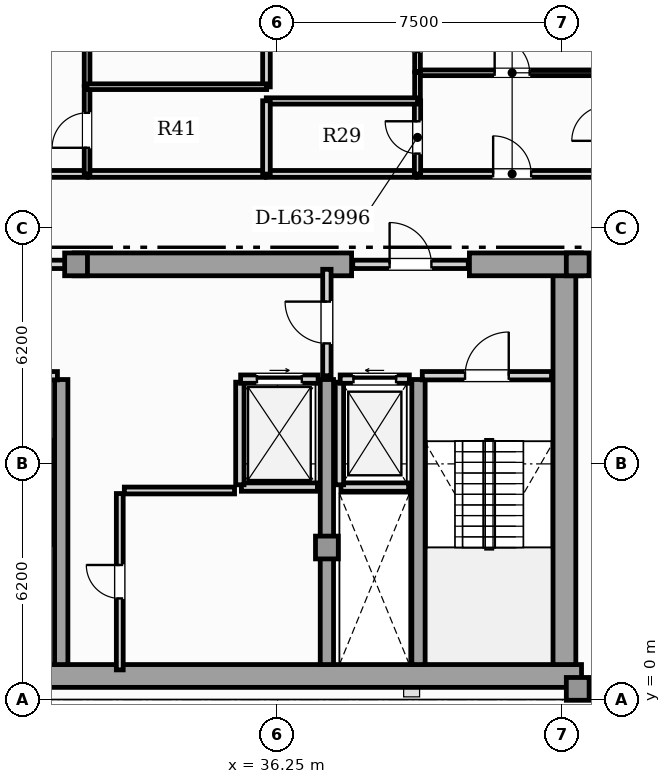
"""IFC4 building model, lengths in metres.
Left out: names, types, materials, properties, quantities, classifications, styles, units other than length and angle.
Written with IfcOpenShell. Run it as: python <this file> out.ifc"""

import sys

from ifc_helpers import new_model, si_unit, direction, frame, frame_2d, origin, origin_2d, place, context, subcontext, project, spatial, rectangle, extrude, element, fill, save


model = new_model("IFC4")
c1 = context("Model", 3, precision=1e-05, world=origin(), true_north=direction((0.0, 1.0)))
c2 = subcontext(c1, "Body", "Model", "MODEL_VIEW")
j1 = project(units=[si_unit("LENGTHUNIT", "METRE"), si_unit("PLANEANGLEUNIT", "RADIAN")], contexts=[c1])
p1 = place(None, origin())
s1 = spatial("IfcSite", under=j1, at=p1, CompositionType="ELEMENT")
p2 = place(p1, origin())
s2 = spatial("IfcBuilding", under=s1, at=p2, CompositionType="ELEMENT")
p3 = place(p2, frame((0.0, 0.0, 256.75)))
s3 = spatial("IfcBuildingStorey", under=s2, at=p3, CompositionType="ELEMENT", Elevation=256.75)
p4 = place(p3, frame((13.25, 0.62, 0.0), z_axis=(0.0, 0.0, 1.0), x_axis=(1.0, 0.0, 0.0)))
e1 = element("IfcWall", 1, at=p4, inside=s3, PredefinedType="SHEAR", context=c2, shape_type="SweptSolid", body=[
    extrude(rectangle(XDim=31.0, YDim=0.6, at=frame_2d((15.5, 0.0))), origin(), (0.0, 0.0, 1.0), 3.65),
])
p5 = place(p3, frame((43.8, 0.92, 0.0), z_axis=(0.0, 0.0, 1.0), x_axis=(0.0, 1.0, 0.0)))
e2 = element("IfcWall", 2, at=p5, inside=s3, PredefinedType="SHEAR", context=c2, shape_type="SweptSolid", body=[
    extrude(rectangle(XDim=10.53, YDim=0.6, at=frame_2d((5.265, 0.0))), origin(), (0.0, 0.0, 1.0), 3.65),
])
p6 = place(p3, frame((30.9, 11.45, 0.0), z_axis=(0.0, 0.0, 1.0), x_axis=(1.0, 0.0, 0.0)))
e3 = element("IfcWall", 3, at=p6, inside=s3, PredefinedType="SHEAR", context=c2, shape_type="SweptSolid", body=[
    extrude(rectangle(XDim=7.3, YDim=0.6, at=frame_2d((3.65, 0.0))), origin(), (0.0, 0.0, 1.0), 3.65),
])
p7 = place(p3, frame((41.3, 11.45, 0.0), z_axis=(0.0, 0.0, 1.0), x_axis=(1.0, 0.0, 0.0)))
e4 = element("IfcWall", 4, at=p7, inside=s3, PredefinedType="SHEAR", context=c2, shape_type="SweptSolid", body=[
    extrude(rectangle(XDim=2.95, YDim=0.6, at=frame_2d((1.475, 0.0))), origin(), (0.0, 0.0, 1.0), 3.65),
])
for number, where, z_axis, x_axis in (
    (5, (30.56, 0.92, 0.0), (0.0, 0.0, 1.0), (0.0, 1.0, 0.0)),
    (6, (37.55, 0.92, 0.0), (0.0, 0.0, 1.0), (0.0, 1.0, 0.0)),
    (7, (39.96, 0.92, 0.0), (0.0, 0.0, 1.0), (0.0, 1.0, 0.0)),
):
    element("IfcWall", number, at=place(p3, frame(where, z_axis=z_axis, x_axis=x_axis)), inside=s3, PredefinedType="SHEAR", context=c2, shape_type="SweptSolid", body=[
        extrude(rectangle(XDim=7.5, YDim=0.35, at=frame_2d((3.75, 0.0))), origin(), (0.0, 0.0, 1.0), 3.65),
    ])
for number, where, z_axis, x_axis in (
    (8, (44.15, 0.28, 0.0), (0.0, 0.0, 1.0), (1.0, 0.0, 0.0)),
    (9, (44.15, 11.45, 0.0), (0.0, 0.0, 1.0), (1.0, 0.0, 0.0)),
    (10, (37.55, 4.0, 0.0), (0.0, 0.0, 1.0), (1.0, 0.0, 0.0)),
    (11, (30.95, 11.45, 0.0), (0.0, 0.0, 1.0), (1.0, 0.0, 0.0)),
):
    element("IfcColumn", number, at=place(p3, frame(where, z_axis=z_axis, x_axis=x_axis)), inside=s3, PredefinedType="COLUMN", context=c2, shape_type="SweptSolid", body=[
        extrude(rectangle(XDim=0.6, YDim=0.6, at=origin_2d()), origin(), (0.0, 0.0, 1.0), 3.85),
    ])
p8 = place(p3, frame((44.25, 0.18, 0.0), z_axis=(0.0, 0.0, 1.0), x_axis=(1.0, 0.0, 0.0)))
e12 = element("IfcWall", 12, at=p8, inside=s3, PredefinedType="SOLIDWALL", context=c2, shape_type="SweptSolid", body=[
    extrude(rectangle(XDim=2.083, YDim=0.26, at=frame_2d((1.042, 0.0))), origin(), (0.0, 0.0, 1.0), 3.65),
])
p9 = place(p3, frame((37.92, 5.59, 0.0), z_axis=(0.0, 0.0, 1.0), x_axis=(1.0, 0.0, 0.0)))
e13 = element("IfcWall", 13, at=p9, inside=s3, PredefinedType="SOLIDWALL", context=c2, shape_type="SweptSolid", body=[
    extrude(rectangle(XDim=1.78, YDim=0.22, at=frame_2d((0.89, 0.0))), origin(), (0.0, 0.0, 1.0), 3.65),
])
p10 = place(p3, frame((37.88, 5.65, 0.0), z_axis=(0.0, 0.0, 1.0), x_axis=(0.0, 1.0, 0.0)))
e14 = element("IfcWall", 14, at=p10, inside=s3, PredefinedType="SOLIDWALL", context=c2, shape_type="SweptSolid", body=[
    extrude(rectangle(XDim=2.7, YDim=0.22, at=frame_2d((1.35, 0.0))), origin(), (0.0, 0.0, 1.0), 3.65),
])
p11 = place(p3, frame((37.9, 8.43, 0.0), z_axis=(0.0, 0.0, 1.0), x_axis=(1.0, 0.0, 0.0)))
e15 = element("IfcWall", 15, at=p11, inside=s3, PredefinedType="SOLIDWALL", context=c2, shape_type="SweptSolid", body=[
    extrude(rectangle(XDim=1.82, YDim=0.22, at=frame_2d((0.91, 0.0))), origin(), (0.0, 0.0, 1.0), 3.65),
])
p12 = place(p11, frame((0.35, 0.0, 0.0)))
e16 = element("IfcOpeningElement", 16, at=p12, cuts=e15, PredefinedType="OPENING", context=c2, shape_type="SweptSolid", body=[
    extrude(rectangle(XDim=1.12, YDim=2.25, at=frame_2d((0.56, 1.125))), frame((0.0, 0.12, 0.0), z_axis=(0.0, -1.0, 0.0), x_axis=(1.0, 0.0, 0.0)), (0.0, 0.0, 1.0), 0.24),
])
p13 = place(p3, frame((35.3, 5.59, 0.0), z_axis=(0.0, 0.0, 1.0), x_axis=(1.0, 0.0, 0.0)))
e17 = element("IfcWall", 17, at=p13, inside=s3, PredefinedType="SOLIDWALL", context=c2, shape_type="SweptSolid", body=[
    extrude(rectangle(XDim=2.0, YDim=0.22, at=frame_2d((1.0, 0.0))), origin(), (0.0, 0.0, 1.0), 3.65),
])
p14 = place(p3, frame((35.26, 5.65, 0.0), z_axis=(0.0, 0.0, 1.0), x_axis=(0.0, 1.0, 0.0)))
e18 = element("IfcWall", 18, at=p14, inside=s3, PredefinedType="SOLIDWALL", context=c2, shape_type="SweptSolid", body=[
    extrude(rectangle(XDim=2.7, YDim=0.22, at=frame_2d((1.35, 0.0))), origin(), (0.0, 0.0, 1.0), 3.65),
])
p15 = place(p3, frame((35.28, 8.43, 0.0), z_axis=(0.0, 0.0, 1.0), x_axis=(1.0, 0.0, 0.0)))
e19 = element("IfcWall", 19, at=p15, inside=s3, PredefinedType="SOLIDWALL", context=c2, shape_type="SweptSolid", body=[
    extrude(rectangle(XDim=2.04, YDim=0.22, at=frame_2d((1.02, 0.0))), origin(), (0.0, 0.0, 1.0), 3.65),
])
p16 = place(p15, frame((0.43, 0.0, 0.0)))
e20 = element("IfcOpeningElement", 20, at=p16, cuts=e19, PredefinedType="OPENING", context=c2, shape_type="SweptSolid", body=[
    extrude(rectangle(XDim=1.18, YDim=2.2, at=frame_2d((0.59, 1.1))), frame((0.0, 0.12, 0.0), z_axis=(0.0, -1.0, 0.0), x_axis=(1.0, 0.0, 0.0)), (0.0, 0.0, 1.0), 0.24),
])
p17 = place(p3, frame((40.06, 8.52, 0.0), z_axis=(0.0, 0.0, 1.0), x_axis=(1.0, 0.0, 0.0)))
e21 = element("IfcWall", 21, at=p17, inside=s3, PredefinedType="SOLIDWALL", context=c2, shape_type="SweptSolid", body=[
    extrude(rectangle(XDim=3.4, YDim=0.22, at=frame_2d((1.7, 0.0))), origin(), (0.0, 0.0, 1.0), 3.65),
])
p18 = place(p17, frame((1.125, 0.0, 0.0)))
e22 = element("IfcOpeningElement", 22, at=p18, cuts=e21, PredefinedType="OPENING", context=c2, shape_type="SweptSolid", body=[
    extrude(rectangle(XDim=1.15, YDim=2.2, at=frame_2d((0.575, 1.1))), frame((0.0, 0.12, 0.0), z_axis=(0.0, -1.0, 0.0), x_axis=(1.0, 0.0, 0.0)), (0.0, 0.0, 1.0), 0.24),
])
p19 = place(p3, frame((27.04, 8.52, 0.0), z_axis=(0.0, 0.0, 1.0), x_axis=(1.0, 0.0, 0.0)))
e23 = element("IfcWall", 23, at=p19, inside=s3, PredefinedType="SOLIDWALL", context=c2, shape_type="SweptSolid", body=[
    extrude(rectangle(XDim=3.42, YDim=0.22, at=frame_2d((1.71, 0.0))), origin(), (0.0, 0.0, 1.0), 3.65),
])
p20 = place(p19, frame((1.135, 0.0, 0.0)))
e24 = element("IfcOpeningElement", 24, at=p20, cuts=e23, PredefinedType="OPENING", context=c2, shape_type="SweptSolid", body=[
    extrude(rectangle(XDim=1.15, YDim=2.2, at=frame_2d((0.575, 1.1))), frame((0.0, 0.12, 0.0), z_axis=(0.0, -1.0, 0.0), x_axis=(1.0, 0.0, 0.0)), (0.0, 0.0, 1.0), 0.24),
])
p21 = place(p3, frame((37.55, 8.52, 0.0), z_axis=(0.0, 0.0, 1.0), x_axis=(0.0, 1.0, 0.0)))
e25 = element("IfcWall", 25, at=p21, inside=s3, PredefinedType="SOLIDWALL", context=c2, shape_type="SweptSolid", body=[
    extrude(rectangle(XDim=2.8, YDim=0.22, at=frame_2d((1.4, 0.0))), origin(), (0.0, 0.0, 1.0), 3.105),
])
p22 = place(p21, frame((0.85, 0.0, 0.0)))
e26 = element("IfcOpeningElement", 26, at=p22, cuts=e25, PredefinedType="OPENING", context=c2, shape_type="SweptSolid", body=[
    extrude(rectangle(XDim=1.1, YDim=2.2, at=frame_2d((0.55, 1.1))), frame((0.0, 0.12, 0.0), z_axis=(0.0, -1.0, 0.0), x_axis=(1.0, 0.0, 0.0)), (0.0, 0.0, 1.0), 0.24),
])
p23 = place(p3, frame((26.63, 11.45, 0.0), z_axis=(0.0, 0.0, 1.0), x_axis=(1.0, 0.0, 0.0)))
e27 = element("IfcWall", 27, at=p23, inside=s3, PredefinedType="SOLIDWALL", context=c2, shape_type="SweptSolid", body=[
    extrude(rectangle(XDim=4.24, YDim=0.22, at=frame_2d((2.12, 0.0))), origin(), (0.0, 0.0, 1.0), 3.65),
])
p24 = place(p23, frame((1.42, 0.0, 0.0)))
e28 = element("IfcOpeningElement", 28, at=p24, cuts=e27, PredefinedType="OPENING", context=c2, shape_type="SweptSolid", body=[
    extrude(rectangle(XDim=1.4, YDim=2.2, at=frame_2d((0.7, 1.1))), frame((0.0, 0.12, 0.0), z_axis=(0.0, -1.0, 0.0), x_axis=(1.0, 0.0, 0.0)), (0.0, 0.0, 1.0), 0.24),
])
p25 = place(p3, frame((38.23, 11.45, 0.0), z_axis=(0.0, 0.0, 1.0), x_axis=(1.0, 0.0, 0.0)))
e29 = element("IfcWall", 29, at=p25, inside=s3, PredefinedType="SOLIDWALL", context=c2, shape_type="SweptSolid", body=[
    extrude(rectangle(XDim=3.04, YDim=0.22, at=frame_2d((1.52, 0.0))), origin(), (0.0, 0.0, 1.0), 3.65),
])
p26 = place(p25, frame((0.97, 0.0, 0.0)))
e30 = element("IfcOpeningElement", 30, at=p26, cuts=e29, PredefinedType="OPENING", context=c2, shape_type="SweptSolid", body=[
    extrude(rectangle(XDim=1.1, YDim=2.2, at=frame_2d((0.55, 1.1))), frame((0.0, 0.12, 0.0), z_axis=(0.0, -1.0, 0.0), x_axis=(1.0, 0.0, 0.0)), (0.0, 0.0, 1.0), 0.24),
])
p27 = place(p3, frame((32.1, 0.78, 0.0), z_axis=(0.0, 0.0, 1.0), x_axis=(0.0, 1.0, 0.0)))
e31 = element("IfcWall", 31, at=p27, inside=s3, PredefinedType="PARTITIONING", context=c2, shape_type="SweptSolid", body=[
    extrude(rectangle(XDim=4.64, YDim=0.18, at=frame_2d((2.32, 0.0))), origin(), (0.0, 0.0, 1.0), 3.65),
])
p28 = place(p27, frame((1.88, 0.0, 0.0)))
e32 = element("IfcOpeningElement", 32, at=p28, cuts=e31, PredefinedType="OPENING", context=c2, shape_type="SweptSolid", body=[
    extrude(rectangle(XDim=0.88, YDim=2.05, at=frame_2d((0.44, 1.025))), frame((0.0, 0.1, 0.0), z_axis=(0.0, -1.0, 0.0), x_axis=(1.0, 0.0, 0.0)), (0.0, 0.0, 1.0), 0.2),
])
p29 = place(p3, frame((32.22, 5.5, 0.0), z_axis=(0.0, 0.0, 1.0), x_axis=(1.0, 0.0, 0.0)))
e33 = element("IfcWall", 33, at=p29, inside=s3, PredefinedType="PARTITIONING", context=c2, shape_type="SweptSolid", body=[
    extrude(rectangle(XDim=2.9, YDim=0.18, at=frame_2d((1.45, 0.0))), origin(), (0.0, 0.0, 1.0), 3.65),
])
p30 = place(p3, frame((44.355, 11.6, 0.0), z_axis=(0.0, 0.0, 1.0), x_axis=(1.0, 0.0, 0.0)))
e34 = element("IfcWall", 34, at=p30, inside=s3, PredefinedType="PARTITIONING", context=c2, shape_type="SweptSolid", body=[
    extrude(rectangle(XDim=5.069, YDim=0.18, at=frame_2d((2.534, 0.0))), origin(), (0.0, 0.0, 1.0), 3.65),
])
p31 = place(p30, frame((2.034, 0.0, 0.0)))
e35 = element("IfcOpeningElement", 35, at=p31, cuts=e34, PredefinedType="OPENING", context=c2, shape_type="SweptSolid", body=[
    extrude(rectangle(XDim=1.0, YDim=2.15, at=frame_2d((0.5, 1.075))), frame((0.0, 0.1, 0.0), z_axis=(0.0, -1.0, 0.0), x_axis=(1.0, 0.0, 0.0)), (0.0, 0.0, 1.0), 0.2),
])
p32 = place(p3, frame((39.929, 13.83, 0.0), z_axis=(0.0, 0.0, 1.0), x_axis=(1.0, 0.0, 0.0)))
e36 = element("IfcWall", 36, at=p32, inside=s3, PredefinedType="PARTITIONING", context=c2, shape_type="SweptSolid", body=[
    extrude(rectangle(XDim=4.99, YDim=0.18, at=frame_2d((2.495, 0.0))), origin(), (0.0, 0.0, 1.0), 3.65),
])
p33 = place(p32, frame((1.995, 0.0, 0.0)))
e37 = element("IfcOpeningElement", 37, at=p33, cuts=e36, PredefinedType="OPENING", context=c2, shape_type="SweptSolid", body=[
    extrude(rectangle(XDim=1.0, YDim=2.15, at=frame_2d((0.5, 1.075))), frame((0.0, 0.1, 0.0), z_axis=(0.0, -1.0, 0.0), x_axis=(1.0, 0.0, 0.0)), (0.0, 0.0, 1.0), 0.2),
])
p34 = place(p3, frame((35.955, 13.83, 0.0), z_axis=(0.0, 0.0, 1.0), x_axis=(1.0, 0.0, 0.0)))
e38 = element("IfcWall", 38, at=p34, inside=s3, PredefinedType="PARTITIONING", context=c2, shape_type="SweptSolid", body=[
    extrude(rectangle(XDim=3.944, YDim=0.18, at=frame_2d((1.972, 0.0))), origin(), (0.0, 0.0, 1.0), 3.65),
])
p35 = place(p3, frame((26.255, 13.83, 0.0), z_axis=(0.0, 0.0, 1.0), x_axis=(1.0, 0.0, 0.0)))
e39 = element("IfcWall", 39, at=p35, inside=s3, PredefinedType="PARTITIONING", context=c2, shape_type="SweptSolid", body=[
    extrude(rectangle(XDim=4.99, YDim=0.18, at=frame_2d((2.495, 0.0))), origin(), (0.0, 0.0, 1.0), 3.65),
])
p36 = place(p35, frame((1.995, 0.0, 0.0)))
e40 = element("IfcOpeningElement", 40, at=p36, cuts=e39, PredefinedType="OPENING", context=c2, shape_type="SweptSolid", body=[
    extrude(rectangle(XDim=1.0, YDim=2.15, at=frame_2d((0.5, 1.075))), frame((0.0, 0.1, 0.0), z_axis=(0.0, -1.0, 0.0), x_axis=(1.0, 0.0, 0.0)), (0.0, 0.0, 1.0), 0.2),
])
p37 = place(p3, frame((31.275, 13.83, 0.0), z_axis=(0.0, 0.0, 1.0), x_axis=(1.0, 0.0, 0.0)))
e41 = element("IfcWall", 41, at=p37, inside=s3, PredefinedType="PARTITIONING", context=c2, shape_type="SweptSolid", body=[
    extrude(rectangle(XDim=4.65, YDim=0.18, at=frame_2d((2.325, 0.0))), origin(), (0.0, 0.0, 1.0), 3.65),
])
p38 = place(p3, frame((39.929, 16.49, 0.0), z_axis=(0.0, 0.0, 1.0), x_axis=(1.0, 0.0, 0.0)))
e42 = element("IfcWall", 42, at=p38, inside=s3, PredefinedType="PARTITIONING", context=c2, shape_type="SweptSolid", body=[
    extrude(rectangle(XDim=4.99, YDim=0.15, at=frame_2d((2.495, 0.0))), origin(), (0.0, 0.0, 1.0), 3.65),
])
p39 = place(p38, frame((2.035, 0.0, 0.0)))
e43 = element("IfcOpeningElement", 43, at=p39, cuts=e42, PredefinedType="OPENING", context=c2, shape_type="SweptSolid", body=[
    extrude(rectangle(XDim=0.92, YDim=2.1, at=frame_2d((0.46, 1.05))), frame((0.0, 0.085, 0.0), z_axis=(0.0, -1.0, 0.0), x_axis=(1.0, 0.0, 0.0)), (0.0, 0.0, 1.0), 0.17),
])
p40 = place(p3, frame((39.934, 13.825, 0.0), z_axis=(0.0, 0.0, 1.0), x_axis=(0.0, 1.0, 0.0)))
e44 = element("IfcWall", 44, at=p40, inside=s3, PredefinedType="PLUMBINGWALL", context=c2, shape_type="SweptSolid", body=[
    extrude(rectangle(XDim=1.929, YDim=0.165, at=frame_2d((0.965, 0.0))), origin(), (0.0, 0.0, 1.0), 3.65),
])
p41 = place(p40, frame((0.54, 0.0, 0.0)))
e45 = element("IfcOpeningElement", 45, at=p41, cuts=e44, PredefinedType="OPENING", context=c2, shape_type="SweptSolid", body=[
    extrude(rectangle(XDim=0.85, YDim=2.1, at=frame_2d((0.425, 1.05))), frame((0.0, 0.093, 0.0), z_axis=(0.0, -1.0, 0.0), x_axis=(1.0, 0.0, 0.0)), (0.0, 0.0, 1.0), 0.185),
])
p42 = place(p3, frame((39.934, 15.784, 0.0), z_axis=(0.0, 0.0, 1.0), x_axis=(0.0, 1.0, 0.0)))
e46 = element("IfcWall", 46, at=p42, inside=s3, PredefinedType="PARTITIONING", context=c2, shape_type="SweptSolid", body=[
    extrude(rectangle(XDim=0.711, YDim=0.15, at=frame_2d((0.355, 0.0))), origin(), (0.0, 0.0, 1.0), 3.65),
])
p43 = place(p3, frame((39.934, 16.525, 0.0), z_axis=(0.0, 0.0, 1.0), x_axis=(0.0, 1.0, 0.0)))
e47 = element("IfcWall", 47, at=p43, inside=s3, PredefinedType="PARTITIONING", context=c2, shape_type="SweptSolid", body=[
    extrude(rectangle(XDim=1.939, YDim=0.15, at=frame_2d((0.97, 0.0))), origin(), (0.0, 0.0, 1.0), 3.65),
])
p44 = place(p43, frame((0.51, 0.0, 0.0)))
e48 = element("IfcOpeningElement", 48, at=p44, cuts=e47, PredefinedType="OPENING", context=c2, shape_type="SweptSolid", body=[
    extrude(rectangle(XDim=0.92, YDim=2.1, at=frame_2d((0.46, 1.05))), frame((0.0, 0.085, 0.0), z_axis=(0.0, -1.0, 0.0), x_axis=(1.0, 0.0, 0.0)), (0.0, 0.0, 1.0), 0.17),
])
p45 = place(p3, frame((35.955, 15.75, 0.0), z_axis=(0.0, 0.0, 1.0), x_axis=(1.0, 0.0, 0.0)))
e49 = element("IfcWall", 49, at=p45, inside=s3, PredefinedType="PLUMBINGWALL", context=c2, shape_type="SweptSolid", body=[
    extrude(rectangle(XDim=3.984, YDim=0.165, at=frame_2d((1.992, 0.0))), origin(), (0.0, 0.0, 1.0), 3.65),
])
p46 = place(p3, frame((35.96, 13.825, 0.0), z_axis=(0.0, 0.0, 1.0), x_axis=(0.0, 1.0, 0.0)))
e50 = element("IfcWall", 50, at=p46, inside=s3, PredefinedType="PARTITIONING", context=c2, shape_type="SweptSolid", body=[
    extrude(rectangle(XDim=1.929, YDim=0.2, at=frame_2d((0.965, 0.0))), origin(), (0.0, 0.0, 1.0), 3.65),
])
p47 = place(p3, frame((35.96, 16.119, 0.0), z_axis=(0.0, 0.0, 1.0), x_axis=(0.0, 1.0, 0.0)))
e51 = element("IfcWall", 51, at=p47, inside=s3, PredefinedType="PARTITIONING", context=c2, shape_type="SweptSolid", body=[
    extrude(rectangle(XDim=2.345, YDim=0.2, at=frame_2d((1.173, 0.0))), origin(), (0.0, 0.0, 1.0), 3.65),
])
p48 = place(p3, frame((31.24, 13.825, 0.0), z_axis=(0.0, 0.0, 1.0), x_axis=(0.0, 1.0, 0.0)))
e52 = element("IfcWall", 52, at=p48, inside=s3, PredefinedType="PARTITIONING", context=c2, shape_type="SweptSolid", body=[
    extrude(rectangle(XDim=2.304, YDim=0.15, at=frame_2d((1.152, 0.0))), origin(), (0.0, 0.0, 1.0), 3.65),
])
p49 = place(p48, frame((0.692, 0.0, 0.0)))
e53 = element("IfcOpeningElement", 53, at=p49, cuts=e52, PredefinedType="OPENING", context=c2, shape_type="SweptSolid", body=[
    extrude(rectangle(XDim=0.92, YDim=2.1, at=frame_2d((0.46, 1.05))), frame((0.0, 0.085, 0.0), z_axis=(0.0, -1.0, 0.0), x_axis=(1.0, 0.0, 0.0)), (0.0, 0.0, 1.0), 0.17),
])
p50 = place(p3, frame((31.24, 16.159, 0.0), z_axis=(0.0, 0.0, 1.0), x_axis=(0.0, 1.0, 0.0)))
e54 = element("IfcWall", 54, at=p50, inside=s3, PredefinedType="PARTITIONING", context=c2, shape_type="SweptSolid", body=[
    extrude(rectangle(XDim=6.922, YDim=0.15, at=frame_2d((3.461, 0.0))), origin(), (0.0, 0.0, 1.0), 3.65),
])
p51 = place(p50, frame((3.001, 0.0, 0.0)))
e55 = element("IfcOpeningElement", 55, at=p51, cuts=e54, PredefinedType="OPENING", context=c2, shape_type="SweptSolid", body=[
    extrude(rectangle(XDim=0.92, YDim=2.1, at=frame_2d((0.46, 1.05))), frame((0.0, 0.085, 0.0), z_axis=(0.0, -1.0, 0.0), x_axis=(1.0, 0.0, 0.0)), (0.0, 0.0, 1.0), 0.17),
])
p52 = place(p3, frame((31.235, 16.125, 0.0), z_axis=(0.0, 0.0, 1.0), x_axis=(1.0, 0.0, 0.0)))
e56 = element("IfcWall", 56, at=p52, inside=s3, PredefinedType="PARTITIONING", context=c2, shape_type="SweptSolid", body=[
    extrude(rectangle(XDim=4.73, YDim=0.15, at=frame_2d((2.365, 0.0))), origin(), (0.0, 0.0, 1.0), 3.65),
])
p53 = place(p12, origin())
e57 = element("IfcDoor", 57, at=p53, inside=s3, OperationType="SLIDING_TO_LEFT", PredefinedType="DOOR", context=c2, shape_type="SweptSolid", body=[
    extrude(rectangle(XDim=1.12, YDim=2.25, at=frame_2d((0.56, 1.125))), frame((0.0, 0.025, 0.0), z_axis=(0.0, -1.0, 0.0), x_axis=(1.0, 0.0, 0.0)), (0.0, 0.0, 1.0), 0.05),
])
fill(e16, e57)
p54 = place(p16, origin())
e58 = element("IfcDoor", 58, at=p54, inside=s3, OperationType="SLIDING_TO_RIGHT", PredefinedType="DOOR", context=c2, shape_type="SweptSolid", body=[
    extrude(rectangle(XDim=1.18, YDim=2.2, at=frame_2d((0.59, 1.1))), frame((0.0, 0.025, 0.0), z_axis=(0.0, -1.0, 0.0), x_axis=(1.0, 0.0, 0.0)), (0.0, 0.0, 1.0), 0.05),
])
fill(e20, e58)
p55 = place(p18, origin())
e59 = element("IfcDoor", 59, at=p55, inside=s3, OperationType="SINGLE_SWING_RIGHT", PredefinedType="DOOR", context=c2, shape_type="SweptSolid", body=[
    extrude(rectangle(XDim=1.15, YDim=2.2, at=frame_2d((0.575, 1.1))), frame((0.0, 0.025, 0.0), z_axis=(0.0, -1.0, 0.0), x_axis=(1.0, 0.0, 0.0)), (0.0, 0.0, 1.0), 0.05),
])
fill(e22, e59)
p56 = place(p22, origin())
e60 = element("IfcDoor", 60, at=p56, inside=s3, OperationType="SINGLE_SWING_RIGHT", PredefinedType="DOOR", context=c2, shape_type="SweptSolid", body=[
    extrude(rectangle(XDim=1.1, YDim=2.2, at=frame_2d((0.55, 1.1))), frame((0.0, 0.025, 0.0), z_axis=(0.0, -1.0, 0.0), x_axis=(1.0, 0.0, 0.0)), (0.0, 0.0, 1.0), 0.05),
])
fill(e26, e60)
p57 = place(p26, origin())
e61 = element("IfcDoor", 61, at=p57, inside=s3, OperationType="SINGLE_SWING_LEFT", PredefinedType="DOOR", context=c2, shape_type="SweptSolid", body=[
    extrude(rectangle(XDim=1.1, YDim=2.2, at=frame_2d((0.55, 1.1))), frame((0.0, 0.025, 0.0), z_axis=(0.0, -1.0, 0.0), x_axis=(1.0, 0.0, 0.0)), (0.0, 0.0, 1.0), 0.05),
])
fill(e30, e61)
p58 = place(p28, origin())
e62 = element("IfcDoor", 62, at=p58, inside=s3, OperationType="SINGLE_SWING_RIGHT", PredefinedType="DOOR", context=c2, shape_type="SweptSolid", body=[
    extrude(rectangle(XDim=0.88, YDim=2.05, at=frame_2d((0.44, 1.025))), frame((0.0, 0.025, 0.0), z_axis=(0.0, -1.0, 0.0), x_axis=(1.0, 0.0, 0.0)), (0.0, 0.0, 1.0), 0.05),
])
fill(e32, e62)
p59 = place(p33, origin())
e63 = element("IfcDoor", 63, at=p59, inside=s3, OperationType="SINGLE_SWING_LEFT", PredefinedType="DOOR", context=c2, shape_type="SweptSolid", body=[
    extrude(rectangle(XDim=1.0, YDim=2.15, at=frame_2d((0.5, 1.075))), frame((0.0, 0.025, 0.0), z_axis=(0.0, -1.0, 0.0), x_axis=(1.0, 0.0, 0.0)), (0.0, 0.0, 1.0), 0.05),
])
fill(e37, e63)
p60 = place(p39, origin())
e64 = element("IfcDoor", 64, at=p60, inside=s3, OperationType="SINGLE_SWING_LEFT", PredefinedType="DOOR", context=c2, shape_type="SweptSolid", body=[
    extrude(rectangle(XDim=0.92, YDim=2.1, at=frame_2d((0.46, 1.05))), frame((0.0, 0.025, 0.0), z_axis=(0.0, -1.0, 0.0), x_axis=(1.0, 0.0, 0.0)), (0.0, 0.0, 1.0), 0.05),
])
fill(e43, e64)
p61 = place(p41, origin())
e65 = element("IfcDoor", 65, at=p61, inside=s3, OperationType="SINGLE_SWING_RIGHT", PredefinedType="DOOR", context=c2, shape_type="SweptSolid", body=[
    extrude(rectangle(XDim=0.85, YDim=2.1, at=frame_2d((0.425, 1.05))), frame((0.0, 0.025, 0.0), z_axis=(0.0, -1.0, 0.0), x_axis=(1.0, 0.0, 0.0)), (0.0, 0.0, 1.0), 0.05),
])
fill(e45, e65)
p62 = place(p49, origin())
e66 = element("IfcDoor", 66, at=p62, inside=s3, OperationType="SINGLE_SWING_LEFT", PredefinedType="DOOR", context=c2, shape_type="SweptSolid", body=[
    extrude(rectangle(XDim=0.92, YDim=2.1, at=frame_2d((0.46, 1.05))), frame((0.0, 0.025, 0.0), z_axis=(0.0, -1.0, 0.0), x_axis=(1.0, 0.0, 0.0)), (0.0, 0.0, 1.0), 0.05),
])
fill(e53, e66)
save(model, sys.argv[1])
